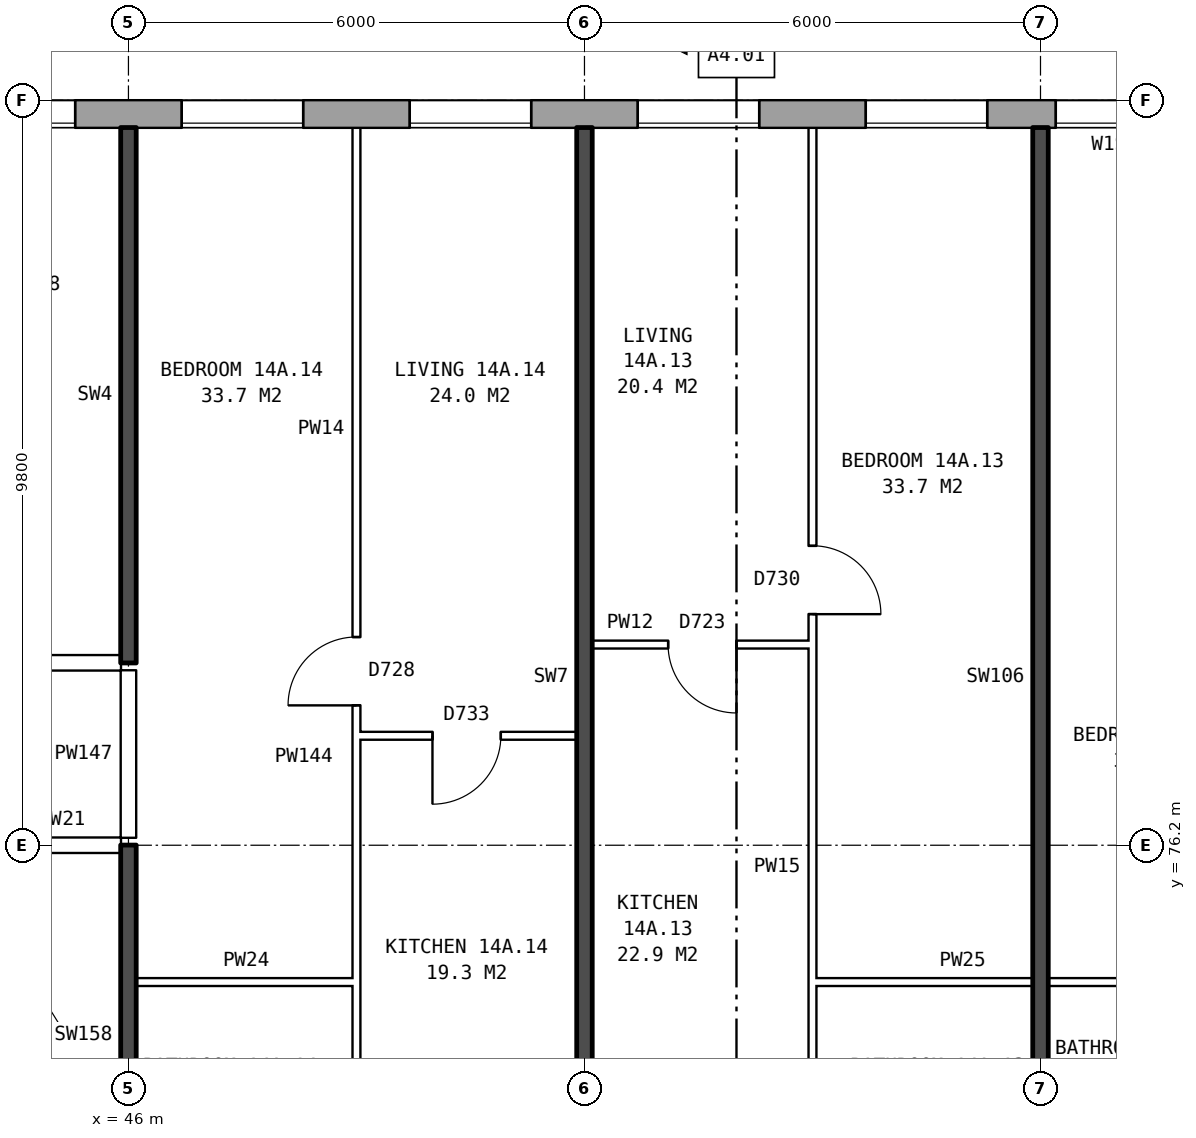
"""IFC4 building model, lengths in metres.
Left out: names, types, materials, properties, quantities, classifications, styles, units other than length and angle.
Written with IfcOpenShell. Run it as: python <this file> out.ifc"""

import sys

from ifc_helpers import new_model, si_unit, direction, frame, frame_2d, origin, place, context, subcontext, project, spatial, rectangle, extrude, element, fill, save


model = new_model("IFC4")
c1 = context("Model", 3, precision=1e-05, world=origin(), true_north=direction((0.0, 1.0)))
c2 = subcontext(c1, "Body", "Model", "MODEL_VIEW")
j1 = project(units=[si_unit("LENGTHUNIT", "METRE"), si_unit("PLANEANGLEUNIT", "RADIAN")], contexts=[c1])
p1 = place(None, origin())
s1 = spatial("IfcSite", under=j1, at=p1, CompositionType="ELEMENT")
p2 = place(p1, origin())
s2 = spatial("IfcBuilding", under=s1, at=p2, CompositionType="ELEMENT")
p3 = place(p2, frame((0.0, 0.0, 53.6)))
s3 = spatial("IfcBuildingStorey", under=s2, at=p3, CompositionType="ELEMENT", Elevation=53.6)
p4 = place(p3, frame((72.925, 85.82, 0.0), z_axis=(0.0, 0.0, 1.0), x_axis=(-1.0, 0.0, 0.0)))
e1 = element("IfcWall", 1, at=p4, inside=s3, PredefinedType="STANDARD", context=c2, shape_type="SweptSolid", body=[
    extrude(rectangle(XDim=48.351, YDim=0.36, at=frame_2d((24.175, 0.0))), origin(), (0.0, 0.0, 1.0), 2.85),
])
p5 = place(p4, frame((0.625, 0.0, 0.8)))
e2 = element("IfcOpeningElement", 2, at=p5, cuts=e1, PredefinedType="OPENING", context=c2, shape_type="SweptSolid", body=[
    extrude(rectangle(XDim=1.6, YDim=1.8, at=frame_2d((0.8, 0.9))), frame((0.0, 0.19, 0.0), z_axis=(0.0, -1.0, 0.0), x_axis=(1.0, 0.0, 0.0)), (0.0, 0.0, 1.0), 0.38),
])
p6 = place(p4, frame((3.625, 0.0, 0.8)))
e3 = element("IfcOpeningElement", 3, at=p6, cuts=e1, PredefinedType="OPENING", context=c2, shape_type="SweptSolid", body=[
    extrude(rectangle(XDim=1.6, YDim=1.8, at=frame_2d((0.8, 0.9))), frame((0.0, 0.19, 0.0), z_axis=(0.0, -1.0, 0.0), x_axis=(1.0, 0.0, 0.0)), (0.0, 0.0, 1.0), 0.38),
])
p7 = place(p4, frame((6.625, 0.0, 0.8)))
e4 = element("IfcOpeningElement", 4, at=p7, cuts=e1, PredefinedType="OPENING", context=c2, shape_type="SweptSolid", body=[
    extrude(rectangle(XDim=1.6, YDim=1.8, at=frame_2d((0.8, 0.9))), frame((0.0, 0.19, 0.0), z_axis=(0.0, -1.0, 0.0), x_axis=(1.0, 0.0, 0.0)), (0.0, 0.0, 1.0), 0.38),
])
p8 = place(p4, frame((9.625, 0.0, 0.8)))
e5 = element("IfcOpeningElement", 5, at=p8, cuts=e1, PredefinedType="OPENING", context=c2, shape_type="SweptSolid", body=[
    extrude(rectangle(XDim=1.6, YDim=1.8, at=frame_2d((0.8, 0.9))), frame((0.0, 0.19, 0.0), z_axis=(0.0, -1.0, 0.0), x_axis=(1.0, 0.0, 0.0)), (0.0, 0.0, 1.0), 0.38),
])
p9 = place(p4, frame((12.075, 0.0, 1.55)))
e6 = element("IfcOpeningElement", 6, at=p9, cuts=e1, PredefinedType="OPENING", context=c2, shape_type="SweptSolid", body=[
    extrude(rectangle(XDim=0.6, YDim=0.9, at=frame_2d((0.3, 0.45))), frame((0.0, 0.19, 0.0), z_axis=(0.0, -1.0, 0.0), x_axis=(1.0, 0.0, 0.0)), (0.0, 0.0, 1.0), 0.38),
])
p10 = place(p4, frame((15.625, 0.0, 0.8)))
e7 = element("IfcOpeningElement", 7, at=p10, cuts=e1, PredefinedType="OPENING", context=c2, shape_type="SweptSolid", body=[
    extrude(rectangle(XDim=1.6, YDim=1.8, at=frame_2d((0.8, 0.9))), frame((0.0, 0.19, 0.0), z_axis=(0.0, -1.0, 0.0), x_axis=(1.0, 0.0, 0.0)), (0.0, 0.0, 1.0), 0.38),
])
p11 = place(p4, frame((18.625, 0.0, 0.8)))
e8 = element("IfcOpeningElement", 8, at=p11, cuts=e1, PredefinedType="OPENING", context=c2, shape_type="SweptSolid", body=[
    extrude(rectangle(XDim=1.6, YDim=1.8, at=frame_2d((0.8, 0.9))), frame((0.0, 0.19, 0.0), z_axis=(0.0, -1.0, 0.0), x_axis=(1.0, 0.0, 0.0)), (0.0, 0.0, 1.0), 0.38),
])
p12 = place(p4, frame((21.625, 0.0, 0.8)))
e9 = element("IfcOpeningElement", 9, at=p12, cuts=e1, PredefinedType="OPENING", context=c2, shape_type="SweptSolid", body=[
    extrude(rectangle(XDim=1.6, YDim=1.8, at=frame_2d((0.8, 0.9))), frame((0.0, 0.19, 0.0), z_axis=(0.0, -1.0, 0.0), x_axis=(1.0, 0.0, 0.0)), (0.0, 0.0, 1.0), 0.38),
])
p13 = place(p4, frame((24.625, 0.0, 0.8)))
e10 = element("IfcOpeningElement", 10, at=p13, cuts=e1, PredefinedType="OPENING", context=c2, shape_type="SweptSolid", body=[
    extrude(rectangle(XDim=1.6, YDim=1.8, at=frame_2d((0.8, 0.9))), frame((0.0, 0.19, 0.0), z_axis=(0.0, -1.0, 0.0), x_axis=(1.0, 0.0, 0.0)), (0.0, 0.0, 1.0), 0.38),
])
p14 = place(p4, frame((27.625, 0.0, 0.8)))
e11 = element("IfcOpeningElement", 11, at=p14, cuts=e1, PredefinedType="OPENING", context=c2, shape_type="SweptSolid", body=[
    extrude(rectangle(XDim=1.6, YDim=1.8, at=frame_2d((0.8, 0.9))), frame((0.0, 0.19, 0.0), z_axis=(0.0, -1.0, 0.0), x_axis=(1.0, 0.0, 0.0)), (0.0, 0.0, 1.0), 0.38),
])
p15 = place(p4, frame((30.625, 0.0, 0.8)))
e12 = element("IfcOpeningElement", 12, at=p15, cuts=e1, PredefinedType="OPENING", context=c2, shape_type="SweptSolid", body=[
    extrude(rectangle(XDim=1.6, YDim=1.8, at=frame_2d((0.8, 0.9))), frame((0.0, 0.19, 0.0), z_axis=(0.0, -1.0, 0.0), x_axis=(1.0, 0.0, 0.0)), (0.0, 0.0, 1.0), 0.38),
])
p16 = place(p4, frame((33.125, 0.0, 0.25)))
e13 = element("IfcOpeningElement", 13, at=p16, cuts=e1, PredefinedType="OPENING", context=c2, shape_type="SweptSolid", body=[
    extrude(rectangle(XDim=0.8, YDim=1.5, at=frame_2d((0.4, 0.75))), frame((0.0, 0.19, 0.0), z_axis=(0.0, -1.0, 0.0), x_axis=(1.0, 0.0, 0.0)), (0.0, 0.0, 1.0), 0.38),
])
p17 = place(p4, frame((36.625, 0.0, 0.8)))
e14 = element("IfcOpeningElement", 14, at=p17, cuts=e1, PredefinedType="OPENING", context=c2, shape_type="SweptSolid", body=[
    extrude(rectangle(XDim=1.6, YDim=1.8, at=frame_2d((0.8, 0.9))), frame((0.0, 0.19, 0.0), z_axis=(0.0, -1.0, 0.0), x_axis=(1.0, 0.0, 0.0)), (0.0, 0.0, 1.0), 0.38),
])
p18 = place(p4, frame((39.625, 0.0, 0.8)))
e15 = element("IfcOpeningElement", 15, at=p18, cuts=e1, PredefinedType="OPENING", context=c2, shape_type="SweptSolid", body=[
    extrude(rectangle(XDim=1.6, YDim=1.8, at=frame_2d((0.8, 0.9))), frame((0.0, 0.19, 0.0), z_axis=(0.0, -1.0, 0.0), x_axis=(1.0, 0.0, 0.0)), (0.0, 0.0, 1.0), 0.38),
])
p19 = place(p4, frame((42.625, 0.0, 0.8)))
e16 = element("IfcOpeningElement", 16, at=p19, cuts=e1, PredefinedType="OPENING", context=c2, shape_type="SweptSolid", body=[
    extrude(rectangle(XDim=1.6, YDim=1.8, at=frame_2d((0.8, 0.9))), frame((0.0, 0.19, 0.0), z_axis=(0.0, -1.0, 0.0), x_axis=(1.0, 0.0, 0.0)), (0.0, 0.0, 1.0), 0.38),
])
p20 = place(p4, frame((45.625, 0.0, 0.8)))
e17 = element("IfcOpeningElement", 17, at=p20, cuts=e1, PredefinedType="OPENING", context=c2, shape_type="SweptSolid", body=[
    extrude(rectangle(XDim=1.6, YDim=1.8, at=frame_2d((0.8, 0.9))), frame((0.0, 0.19, 0.0), z_axis=(0.0, -1.0, 0.0), x_axis=(1.0, 0.0, 0.0)), (0.0, 0.0, 1.0), 0.38),
])
p21 = place(p4, frame((13.325, 0.0, 0.15)))
e18 = element("IfcOpeningElement", 18, at=p21, cuts=e1, PredefinedType="OPENING", context=c2, shape_type="SweptSolid", body=[
    extrude(rectangle(XDim=1.4, YDim=0.9, at=frame_2d((0.7, 0.45))), frame((0.0, 0.19, 0.0), z_axis=(0.0, -1.0, 0.0), x_axis=(1.0, 0.0, 0.0)), (0.0, 0.0, 1.0), 0.38),
])
p22 = place(p4, frame((34.225, 0.0, 0.25)))
e19 = element("IfcOpeningElement", 19, at=p22, cuts=e1, PredefinedType="OPENING", context=c2, shape_type="SweptSolid", body=[
    extrude(rectangle(XDim=0.6, YDim=0.9, at=frame_2d((0.3, 0.45))), frame((0.0, 0.19, 0.0), z_axis=(0.0, -1.0, 0.0), x_axis=(1.0, 0.0, 0.0)), (0.0, 0.0, 1.0), 0.38),
])
p23 = place(p3, frame((46.1, 74.4, 0.0), z_axis=(0.0, 0.0, 1.0), x_axis=(1.0, 0.0, 0.0)))
e20 = element("IfcWall", 20, at=p23, inside=s3, PredefinedType="PARTITIONING", context=c2, shape_type="SweptSolid", body=[
    extrude(rectangle(XDim=2.9, YDim=0.1, at=frame_2d((1.45, 0.0))), origin(), (0.0, 0.0, 1.0), 2.85),
])
p24 = place(p3, frame((55.0, 74.4, 0.0), z_axis=(0.0, 0.0, 1.0), x_axis=(1.0, 0.0, 0.0)))
e21 = element("IfcWall", 21, at=p24, inside=s3, PredefinedType="PARTITIONING", context=c2, shape_type="SweptSolid", body=[
    extrude(rectangle(XDim=6.0, YDim=0.1, at=frame_2d((3.0, 0.0))), origin(), (0.0, 0.0, 1.0), 2.85),
])
p25 = place(p3, frame((44.36, 76.2, 0.0), z_axis=(0.0, 0.0, 1.0), x_axis=(1.0, 0.0, 0.0)))
e22 = element("IfcWall", 22, at=p25, inside=s3, PredefinedType="PARTITIONING", context=c2, shape_type="SweptSolid", body=[
    extrude(rectangle(XDim=1.54, YDim=0.2, at=frame_2d((0.77, 0.0))), origin(), (0.0, 0.0, 1.0), 2.85),
])
p26 = place(p3, frame((49.0, 77.64, 0.0), z_axis=(0.0, 0.0, 1.0), x_axis=(1.0, 0.0, 0.0)))
e23 = element("IfcWall", 23, at=p26, inside=s3, PredefinedType="PARTITIONING", context=c2, shape_type="SweptSolid", body=[
    extrude(rectangle(XDim=2.9, YDim=0.1, at=frame_2d((1.45, 0.0))), origin(), (0.0, 0.0, 1.0), 2.85),
])
p27 = place(p26, frame((1.0, 0.0, 0.0)))
e24 = element("IfcOpeningElement", 24, at=p27, cuts=e23, PredefinedType="OPENING", context=c2, shape_type="SweptSolid", body=[
    extrude(rectangle(XDim=0.9, YDim=2.1, at=frame_2d((0.45, 1.05))), frame((0.0, 0.06, 0.0), z_axis=(0.0, -1.0, 0.0), x_axis=(1.0, 0.0, 0.0)), (0.0, 0.0, 1.0), 0.12),
])
p28 = place(p3, frame((21.86, 78.6, 0.0), z_axis=(0.0, 0.0, 1.0), x_axis=(1.0, 0.0, 0.0)))
e25 = element("IfcWall", 25, at=p28, inside=s3, PredefinedType="PARTITIONING", context=c2, shape_type="SweptSolid", body=[
    extrude(rectangle(XDim=24.04, YDim=0.2, at=frame_2d((12.02, 0.0))), origin(), (0.0, 0.0, 1.0), 2.85),
])
p29 = place(p28, frame((20.59, 0.0, 0.0)))
e26 = element("IfcOpeningElement", 26, at=p29, cuts=e25, PredefinedType="OPENING", context=c2, shape_type="SweptSolid", body=[
    extrude(rectangle(XDim=1.0, YDim=2.1, at=frame_2d((0.5, 1.05))), frame((0.0, 0.11, 0.0), z_axis=(0.0, -1.0, 0.0), x_axis=(1.0, 0.0, 0.0)), (0.0, 0.0, 1.0), 0.22),
])
p30 = place(p28, frame((8.64, 0.0, 0.0)))
e27 = element("IfcOpeningElement", 27, at=p30, cuts=e25, PredefinedType="OPENING", context=c2, shape_type="SweptSolid", body=[
    extrude(rectangle(XDim=1.0, YDim=2.1, at=frame_2d((0.5, 1.05))), frame((0.0, 0.11, 0.0), z_axis=(0.0, -1.0, 0.0), x_axis=(1.0, 0.0, 0.0)), (0.0, 0.0, 1.0), 0.22),
])
p31 = place(p28, frame((3.64, 0.0, 0.0)))
e28 = element("IfcOpeningElement", 28, at=p31, cuts=e25, PredefinedType="OPENING", context=c2, shape_type="SweptSolid", body=[
    extrude(rectangle(XDim=1.0, YDim=2.1, at=frame_2d((0.5, 1.05))), frame((0.0, 0.11, 0.0), z_axis=(0.0, -1.0, 0.0), x_axis=(1.0, 0.0, 0.0)), (0.0, 0.0, 1.0), 0.22),
])
p32 = place(p3, frame((52.1, 78.84, 0.0), z_axis=(0.0, 0.0, 1.0), x_axis=(1.0, 0.0, 0.0)))
e29 = element("IfcWall", 29, at=p32, inside=s3, PredefinedType="PARTITIONING", context=c2, shape_type="SweptSolid", body=[
    extrude(rectangle(XDim=2.9, YDim=0.1, at=frame_2d((1.45, 0.0))), origin(), (0.0, 0.0, 1.0), 2.85),
])
p33 = place(p32, frame((1.0, 0.0, 0.0)))
e30 = element("IfcOpeningElement", 30, at=p33, cuts=e29, PredefinedType="OPENING", context=c2, shape_type="SweptSolid", body=[
    extrude(rectangle(XDim=0.9, YDim=2.1, at=frame_2d((0.45, 1.05))), frame((0.0, 0.06, 0.0), z_axis=(0.0, -1.0, 0.0), x_axis=(1.0, 0.0, 0.0)), (0.0, 0.0, 1.0), 0.12),
])
p34 = place(p3, frame((46.0, 71.2, 0.0), z_axis=(0.0, 0.0, 1.0), x_axis=(0.0, 1.0, 0.0)))
e31 = element("IfcWall", 31, at=p34, inside=s3, PredefinedType="SOLIDWALL", context=c2, shape_type="SweptSolid", body=[
    extrude(rectangle(XDim=5.0, YDim=0.2, at=frame_2d((2.5, 0.0))), origin(), (0.0, 0.0, 1.0), 2.85),
])
p35 = place(p3, frame((46.0, 76.3, 0.0), z_axis=(0.0, 0.0, 1.0), x_axis=(0.0, 1.0, 0.0)))
e32 = element("IfcWall", 32, at=p35, inside=s3, PredefinedType="PARTITIONING", context=c2, shape_type="SweptSolid", body=[
    extrude(rectangle(XDim=2.2, YDim=0.2, at=frame_2d((1.1, 0.0))), origin(), (0.0, 0.0, 1.0), 2.85),
])
p36 = place(p3, frame((46.0, 78.6, 0.0), z_axis=(0.0, 0.0, 1.0), x_axis=(0.0, 1.0, 0.0)))
e33 = element("IfcWall", 33, at=p36, inside=s3, PredefinedType="SOLIDWALL", context=c2, shape_type="SweptSolid", body=[
    extrude(rectangle(XDim=7.04, YDim=0.2, at=frame_2d((3.52, 0.0))), origin(), (0.0, 0.0, 1.0), 2.85),
])
p37 = place(p3, frame((49.0, 71.3, 0.0), z_axis=(0.0, 0.0, 1.0), x_axis=(0.0, 1.0, 0.0)))
e34 = element("IfcWall", 34, at=p37, inside=s3, PredefinedType="PARTITIONING", context=c2, shape_type="SweptSolid", body=[
    extrude(rectangle(XDim=14.34, YDim=0.1, at=frame_2d((7.17, 0.0))), origin(), (0.0, 0.0, 1.0), 2.85),
])
p38 = place(p37, frame((6.74, 0.0, 0.0)))
e35 = element("IfcOpeningElement", 35, at=p38, cuts=e34, PredefinedType="OPENING", context=c2, shape_type="SweptSolid", body=[
    extrude(rectangle(XDim=0.9, YDim=2.1, at=frame_2d((0.45, 1.05))), frame((0.0, 0.06, 0.0), z_axis=(0.0, -1.0, 0.0), x_axis=(1.0, 0.0, 0.0)), (0.0, 0.0, 1.0), 0.12),
])
p39 = place(p37, frame((0.4, 0.0, 0.0)))
e36 = element("IfcOpeningElement", 36, at=p39, cuts=e34, PredefinedType="OPENING", context=c2, shape_type="SweptSolid", body=[
    extrude(rectangle(XDim=0.9, YDim=2.1, at=frame_2d((0.45, 1.05))), frame((0.0, 0.06, 0.0), z_axis=(0.0, -1.0, 0.0), x_axis=(1.0, 0.0, 0.0)), (0.0, 0.0, 1.0), 0.12),
])
p40 = place(p3, frame((52.0, 71.2, 0.0), z_axis=(0.0, 0.0, 1.0), x_axis=(0.0, 1.0, 0.0)))
e37 = element("IfcWall", 37, at=p40, inside=s3, PredefinedType="SOLIDWALL", context=c2, shape_type="SweptSolid", body=[
    extrude(rectangle(XDim=14.44, YDim=0.2, at=frame_2d((7.22, 0.0))), origin(), (0.0, 0.0, 1.0), 2.85),
])
p41 = place(p3, frame((55.0, 71.3, 0.0), z_axis=(0.0, 0.0, 1.0), x_axis=(0.0, 1.0, 0.0)))
e38 = element("IfcWall", 38, at=p41, inside=s3, PredefinedType="PARTITIONING", context=c2, shape_type="SweptSolid", body=[
    extrude(rectangle(XDim=14.34, YDim=0.1, at=frame_2d((7.17, 0.0))), origin(), (0.0, 0.0, 1.0), 2.85),
])
p42 = place(p41, frame((7.94, 0.0, 0.0)))
e39 = element("IfcOpeningElement", 39, at=p42, cuts=e38, PredefinedType="OPENING", context=c2, shape_type="SweptSolid", body=[
    extrude(rectangle(XDim=0.9, YDim=2.1, at=frame_2d((0.45, 1.05))), frame((0.0, 0.06, 0.0), z_axis=(0.0, -1.0, 0.0), x_axis=(1.0, 0.0, 0.0)), (0.0, 0.0, 1.0), 0.12),
])
p43 = place(p41, frame((0.4, 0.0, 0.0)))
e40 = element("IfcOpeningElement", 40, at=p43, cuts=e38, PredefinedType="OPENING", context=c2, shape_type="SweptSolid", body=[
    extrude(rectangle(XDim=0.9, YDim=2.1, at=frame_2d((0.45, 1.05))), frame((0.0, 0.06, 0.0), z_axis=(0.0, -1.0, 0.0), x_axis=(1.0, 0.0, 0.0)), (0.0, 0.0, 1.0), 0.12),
])
p44 = place(p3, frame((58.0, 71.2, 0.0), z_axis=(0.0, 0.0, 1.0), x_axis=(0.0, 1.0, 0.0)))
e41 = element("IfcWall", 41, at=p44, inside=s3, PredefinedType="SOLIDWALL", context=c2, shape_type="SweptSolid", body=[
    extrude(rectangle(XDim=14.44, YDim=0.2, at=frame_2d((7.22, 0.0))), origin(), (0.0, 0.0, 1.0), 2.85),
])
p45 = place(p10, origin())
e42 = element("IfcWindow", 42, at=p45, inside=s3, PartitioningType="SINGLE_PANEL", PredefinedType="WINDOW", context=c2, shape_type="SweptSolid", body=[
    extrude(rectangle(XDim=1.6, YDim=1.8, at=frame_2d((0.8, 0.9))), frame((0.0, 0.15, 0.0), z_axis=(0.0, -1.0, 0.0), x_axis=(1.0, 0.0, 0.0)), (0.0, 0.0, 1.0), 0.06),
])
fill(e7, e42)
p46 = place(p11, origin())
e43 = element("IfcWindow", 43, at=p46, inside=s3, PartitioningType="SINGLE_PANEL", PredefinedType="WINDOW", context=c2, shape_type="SweptSolid", body=[
    extrude(rectangle(XDim=1.6, YDim=1.8, at=frame_2d((0.8, 0.9))), frame((0.0, 0.15, 0.0), z_axis=(0.0, -1.0, 0.0), x_axis=(1.0, 0.0, 0.0)), (0.0, 0.0, 1.0), 0.06),
])
fill(e8, e43)
p47 = place(p12, origin())
e44 = element("IfcWindow", 44, at=p47, inside=s3, PartitioningType="SINGLE_PANEL", PredefinedType="WINDOW", context=c2, shape_type="SweptSolid", body=[
    extrude(rectangle(XDim=1.6, YDim=1.8, at=frame_2d((0.8, 0.9))), frame((0.0, 0.15, 0.0), z_axis=(0.0, -1.0, 0.0), x_axis=(1.0, 0.0, 0.0)), (0.0, 0.0, 1.0), 0.06),
])
fill(e9, e44)
p48 = place(p13, origin())
e45 = element("IfcWindow", 45, at=p48, inside=s3, PartitioningType="SINGLE_PANEL", PredefinedType="WINDOW", context=c2, shape_type="SweptSolid", body=[
    extrude(rectangle(XDim=1.6, YDim=1.8, at=frame_2d((0.8, 0.9))), frame((0.0, 0.15, 0.0), z_axis=(0.0, -1.0, 0.0), x_axis=(1.0, 0.0, 0.0)), (0.0, 0.0, 1.0), 0.06),
])
fill(e10, e45)
p49 = place(p14, origin())
e46 = element("IfcWindow", 46, at=p49, inside=s3, PartitioningType="SINGLE_PANEL", PredefinedType="WINDOW", context=c2, shape_type="SweptSolid", body=[
    extrude(rectangle(XDim=1.6, YDim=1.8, at=frame_2d((0.8, 0.9))), frame((0.0, 0.15, 0.0), z_axis=(0.0, -1.0, 0.0), x_axis=(1.0, 0.0, 0.0)), (0.0, 0.0, 1.0), 0.06),
])
fill(e11, e46)
p50 = place(p42, frame((0.9, 0.0, 0.0), z_axis=(0.0, 0.0, 1.0), x_axis=(-1.0, 0.0, 0.0)))
e47 = element("IfcDoor", 47, at=p50, inside=s3, OperationType="SINGLE_SWING_RIGHT", PredefinedType="DOOR", context=c2, shape_type="SweptSolid", body=[
    extrude(rectangle(XDim=0.9, YDim=2.1, at=frame_2d((0.45, 1.05))), frame((0.0, 0.025, 0.0), z_axis=(0.0, -1.0, 0.0), x_axis=(1.0, 0.0, 0.0)), (0.0, 0.0, 1.0), 0.05),
])
fill(e39, e47)
p51 = place(p33, frame((0.9, 0.0, 0.0), z_axis=(0.0, 0.0, 1.0), x_axis=(-1.0, 0.0, 0.0)))
e48 = element("IfcDoor", 48, at=p51, inside=s3, OperationType="SINGLE_SWING_LEFT", PredefinedType="DOOR", context=c2, shape_type="SweptSolid", body=[
    extrude(rectangle(XDim=0.9, YDim=2.1, at=frame_2d((0.45, 1.05))), frame((0.0, 0.025, 0.0), z_axis=(0.0, -1.0, 0.0), x_axis=(1.0, 0.0, 0.0)), (0.0, 0.0, 1.0), 0.05),
])
fill(e30, e48)
p52 = place(p38, origin())
e49 = element("IfcDoor", 49, at=p52, inside=s3, OperationType="SINGLE_SWING_LEFT", PredefinedType="DOOR", context=c2, shape_type="SweptSolid", body=[
    extrude(rectangle(XDim=0.9, YDim=2.1, at=frame_2d((0.45, 1.05))), frame((0.0, 0.025, 0.0), z_axis=(0.0, -1.0, 0.0), x_axis=(1.0, 0.0, 0.0)), (0.0, 0.0, 1.0), 0.05),
])
fill(e35, e49)
p53 = place(p27, frame((0.9, 0.0, 0.0), z_axis=(0.0, 0.0, 1.0), x_axis=(-1.0, 0.0, 0.0)))
e50 = element("IfcDoor", 50, at=p53, inside=s3, OperationType="SINGLE_SWING_RIGHT", PredefinedType="DOOR", context=c2, shape_type="SweptSolid", body=[
    extrude(rectangle(XDim=0.9, YDim=2.1, at=frame_2d((0.45, 1.05))), frame((0.0, 0.025, 0.0), z_axis=(0.0, -1.0, 0.0), x_axis=(1.0, 0.0, 0.0)), (0.0, 0.0, 1.0), 0.05),
])
fill(e24, e50)
p54 = place(p21, origin())
e51 = element("IfcWindow", 51, at=p54, inside=s3, PartitioningType="SINGLE_PANEL", PredefinedType="WINDOW", context=c2, shape_type="SweptSolid", body=[
    extrude(rectangle(XDim=1.4, YDim=0.9, at=frame_2d((0.7, 0.45))), frame((0.0, 0.15, 0.0), z_axis=(0.0, -1.0, 0.0), x_axis=(1.0, 0.0, 0.0)), (0.0, 0.0, 1.0), 0.06),
])
fill(e18, e51)
save(model, sys.argv[1])
